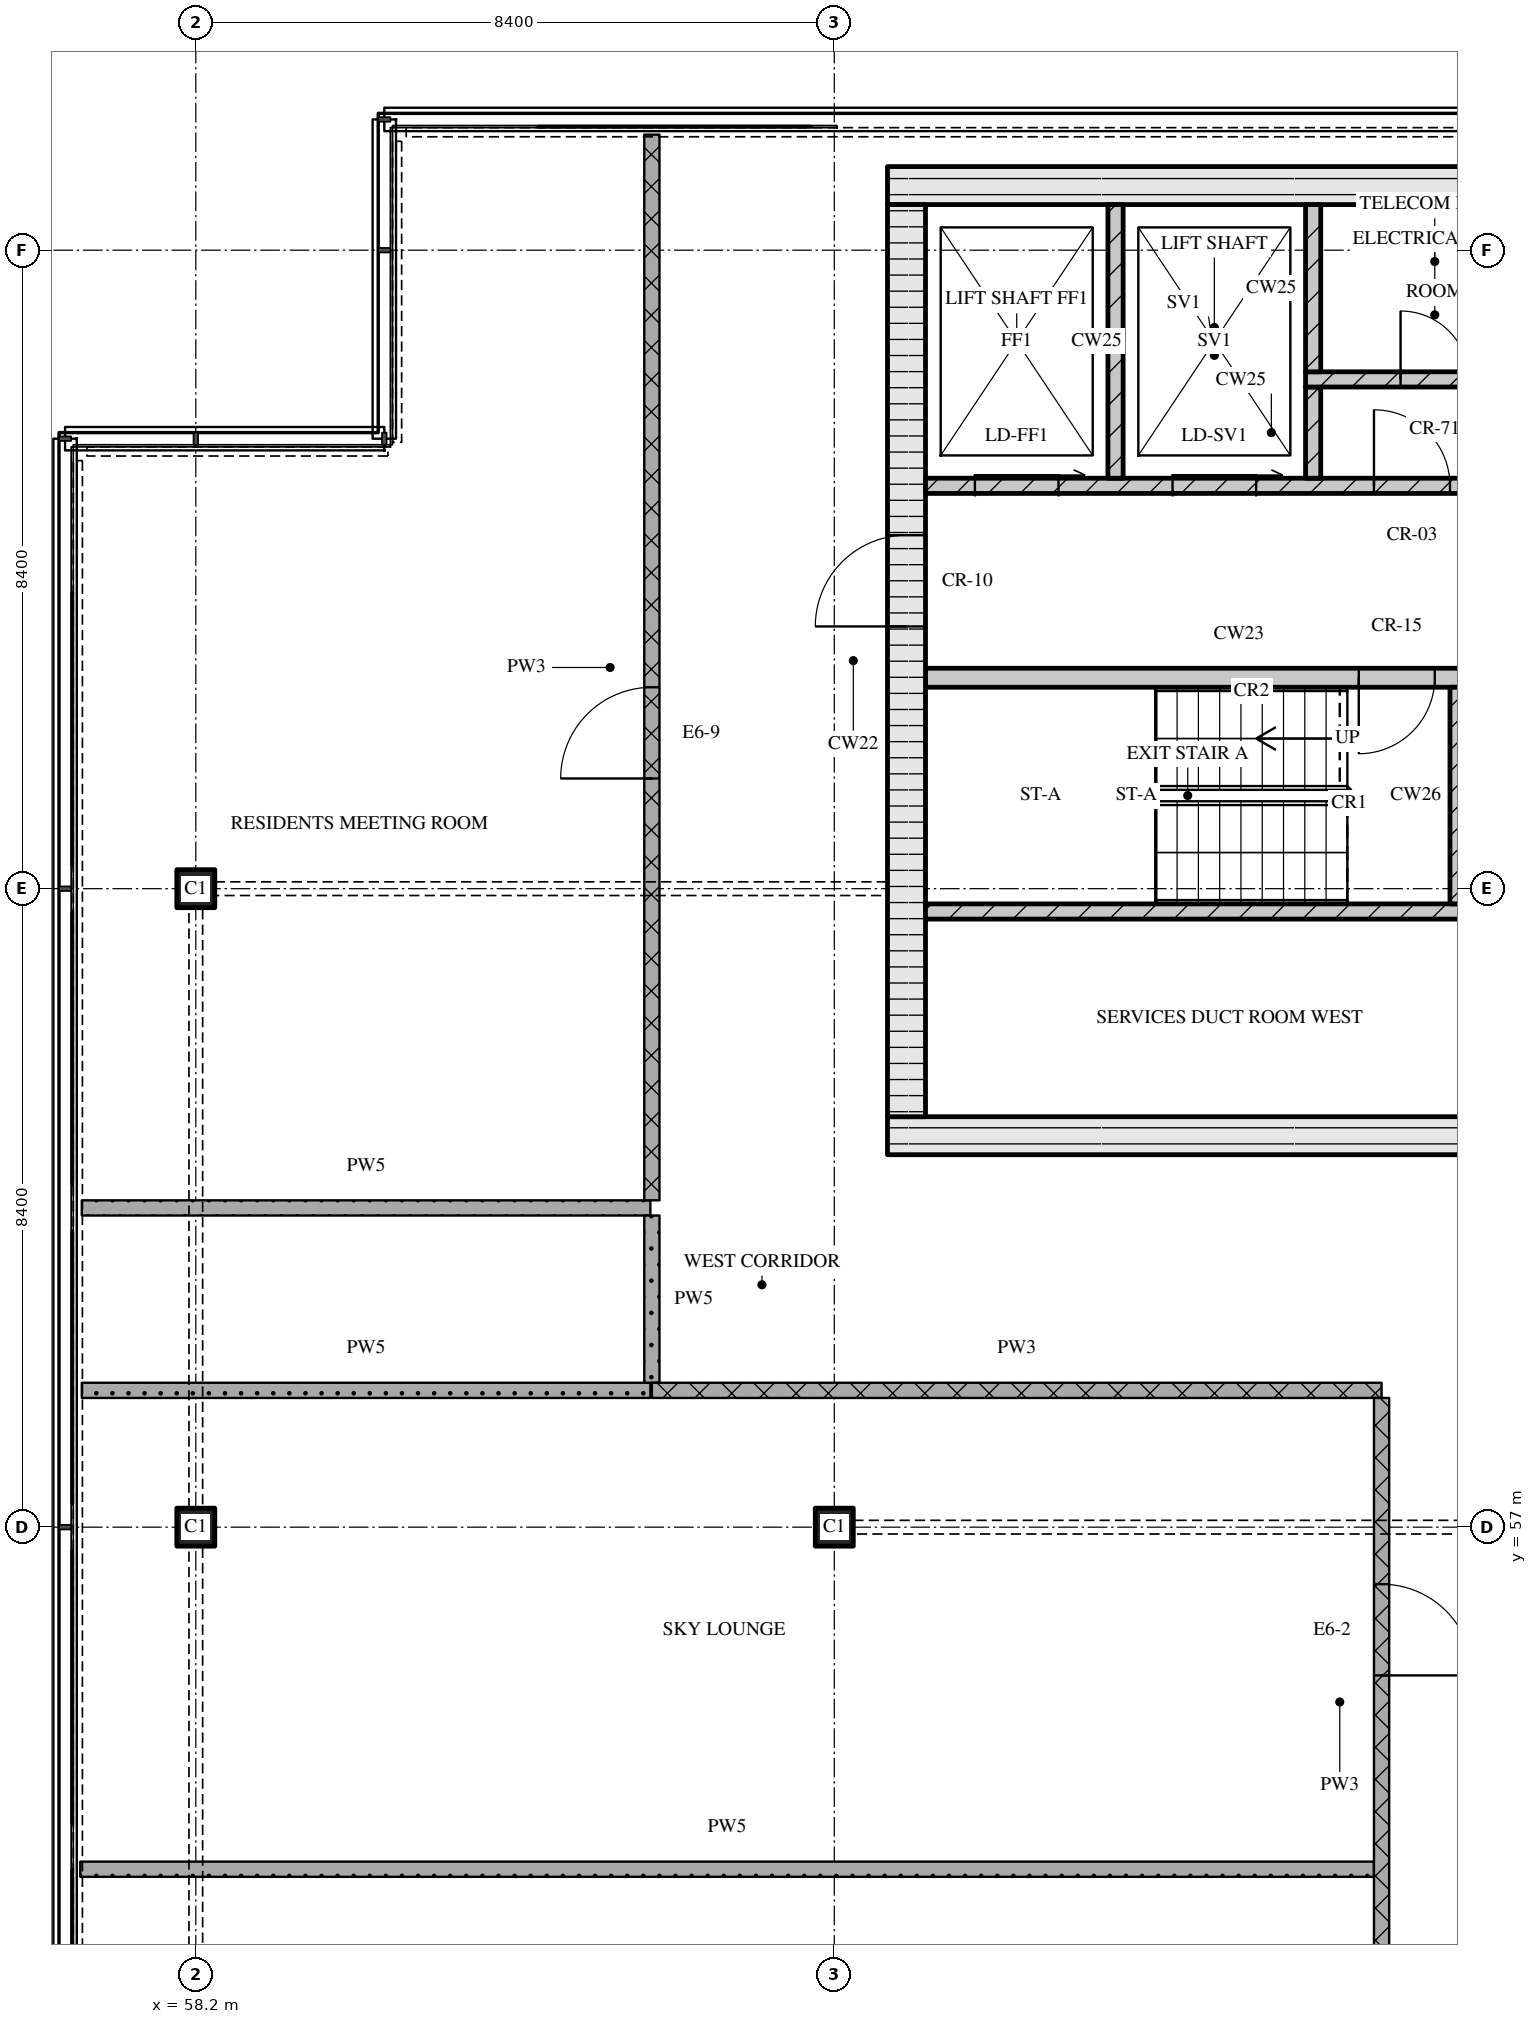
"""IFC4 building model, lengths in metres.
Left out: names, types, materials, properties, quantities, classifications, styles, units other than length and angle.
Written with IfcOpenShell. Run it as: python <this file> out.ifc"""

import sys

from ifc_helpers import new_model, si_unit, direction, frame, frame_2d, origin, origin_2d, place, context, subcontext, project, spatial, rectangle, extrude, element, fill, save


model = new_model("IFC4")
c1 = context("Model", 3, precision=1e-05, world=origin(), true_north=direction((0.0, 1.0)))
c2 = subcontext(c1, "Body", "Model", "MODEL_VIEW")
j1 = project(units=[si_unit("LENGTHUNIT", "METRE"), si_unit("PLANEANGLEUNIT", "RADIAN")], contexts=[c1])
p1 = place(None, origin())
s1 = spatial("IfcSite", under=j1, at=p1, CompositionType="ELEMENT")
p2 = place(p1, origin())
s2 = spatial("IfcBuilding", under=s1, at=p2, CompositionType="ELEMENT")
p3 = place(p2, frame((0.0, 0.0, 306.75)))
s3 = spatial("IfcBuildingStorey", under=s2, at=p3, CompositionType="ELEMENT", Elevation=306.75)
for number, where, z_axis, x_axis in (
    (1, (58.2, 57.0, 0.0), (0.0, 0.0, 1.0), (1.0, 0.0, 0.0)),
    (2, (58.2, 65.4, 0.0), (0.0, 0.0, 1.0), (1.0, 0.0, 0.0)),
    (3, (66.6, 57.0, 0.0), (0.0, 0.0, 1.0), (1.0, 0.0, 0.0)),
):
    element("IfcColumn", number, at=place(p3, frame(where, z_axis=z_axis, x_axis=x_axis)), inside=s3, PredefinedType="COLUMN", context=c2, shape_type="SweptSolid", body=[
        extrude(rectangle(XDim=0.5, YDim=0.5, at=origin_2d()), origin(), (0.0, 0.0, 1.0), 3.6),
    ])
p4 = place(p3, frame((67.3, 62.15, 0.0), z_axis=(0.0, 0.0, 1.0), x_axis=(1.0, 0.0, 0.0)))
e4 = element("IfcWall", 4, at=p4, inside=s3, PredefinedType="SOLIDWALL", context=c2, shape_type="SweptSolid", body=[
    extrude(rectangle(XDim=40.6, YDim=0.5, at=frame_2d((20.3, 0.0))), origin(), (0.0, 0.0, 1.0), 3.3),
])
p5 = place(p4, frame((20.65, 0.0, 0.0)))
e5 = element("IfcOpeningElement", 5, at=p5, cuts=e4, PredefinedType="OPENING", context=c2, shape_type="SweptSolid", body=[
    extrude(rectangle(XDim=1.8, YDim=2.1, at=frame_2d((0.9, 1.05))), frame((0.0, 0.26, 0.0), z_axis=(0.0, -1.0, 0.0), x_axis=(1.0, 0.0, 0.0)), (0.0, 0.0, 1.0), 0.52),
])
p6 = place(p3, frame((67.3, 74.65, 0.0), z_axis=(0.0, 0.0, 1.0), x_axis=(1.0, 0.0, 0.0)))
e6 = element("IfcWall", 6, at=p6, inside=s3, PredefinedType="SOLIDWALL", context=c2, shape_type="SweptSolid", body=[
    extrude(rectangle(XDim=40.6, YDim=0.5, at=frame_2d((20.3, 0.0))), origin(), (0.0, 0.0, 1.0), 3.3),
])
p7 = place(p3, frame((67.55, 62.4, 0.0), z_axis=(0.0, 0.0, 1.0), x_axis=(0.0, 1.0, 0.0)))
e7 = element("IfcWall", 7, at=p7, inside=s3, PredefinedType="SOLIDWALL", context=c2, shape_type="SweptSolid", body=[
    extrude(rectangle(XDim=12.0, YDim=0.5, at=frame_2d((6.0, 0.0))), origin(), (0.0, 0.0, 1.0), 3.3),
])
p8 = place(p7, frame((6.45, 0.0, 0.0)))
e8 = element("IfcOpeningElement", 8, at=p8, cuts=e7, PredefinedType="OPENING", context=c2, shape_type="SweptSolid", body=[
    extrude(rectangle(XDim=1.2, YDim=2.1, at=frame_2d((0.6, 1.05))), frame((0.0, 0.26, 0.0), z_axis=(0.0, -1.0, 0.0), x_axis=(1.0, 0.0, 0.0)), (0.0, 0.0, 1.0), 0.52),
])
p9 = place(p3, frame((67.8, 65.1, 0.0), z_axis=(0.0, 0.0, 1.0), x_axis=(1.0, 0.0, 0.0)))
e9 = element("IfcWall", 9, at=p9, inside=s3, PredefinedType="SOLIDWALL", context=c2, shape_type="SweptSolid", body=[
    extrude(rectangle(XDim=18.5, YDim=0.2, at=frame_2d((9.25, 0.0))), origin(), (0.0, 0.0, 1.0), 3.3),
])
p10 = place(p9, frame((7.27, 0.0, 0.0)))
e10 = element("IfcOpeningElement", 10, at=p10, cuts=e9, PredefinedType="OPENING", context=c2, shape_type="SweptSolid", body=[
    extrude(rectangle(XDim=0.9, YDim=2.1, at=frame_2d((0.45, 1.05))), frame((0.0, 0.11, 0.0), z_axis=(0.0, -1.0, 0.0), x_axis=(1.0, 0.0, 0.0)), (0.0, 0.0, 1.0), 0.22),
])
p11 = place(p9, frame((11.45, 0.0, 0.0)))
e11 = element("IfcOpeningElement", 11, at=p11, cuts=e9, PredefinedType="OPENING", context=c2, shape_type="SweptSolid", body=[
    extrude(rectangle(XDim=0.9, YDim=2.1, at=frame_2d((0.45, 1.05))), frame((0.0, 0.11, 0.0), z_axis=(0.0, -1.0, 0.0), x_axis=(1.0, 0.0, 0.0)), (0.0, 0.0, 1.0), 0.22),
])
p12 = place(p9, frame((16.7, 0.0, 0.0)))
e12 = element("IfcOpeningElement", 12, at=p12, cuts=e9, PredefinedType="OPENING", context=c2, shape_type="SweptSolid", body=[
    extrude(rectangle(XDim=0.9, YDim=2.1, at=frame_2d((0.45, 1.05))), frame((0.0, 0.11, 0.0), z_axis=(0.0, -1.0, 0.0), x_axis=(1.0, 0.0, 0.0)), (0.0, 0.0, 1.0), 0.22),
])
p13 = place(p3, frame((74.85, 65.2, 0.0), z_axis=(0.0, 0.0, 1.0), x_axis=(0.0, 1.0, 0.0)))
e13 = element("IfcWall", 13, at=p13, inside=s3, PredefinedType="SOLIDWALL", context=c2, shape_type="SweptSolid", body=[
    extrude(rectangle(XDim=2.85, YDim=0.3, at=frame_2d((1.425, 0.0))), origin(), (0.0, 0.0, 1.0), 3.3),
])
p14 = place(p3, frame((67.8, 68.175, 0.0), z_axis=(0.0, 0.0, 1.0), x_axis=(1.0, 0.0, 0.0)))
e14 = element("IfcWall", 14, at=p14, inside=s3, PredefinedType="SOLIDWALL", context=c2, shape_type="SweptSolid", body=[
    extrude(rectangle(XDim=8.25, YDim=0.25, at=frame_2d((4.125, 0.0))), origin(), (0.0, 0.0, 1.0), 3.3),
])
p15 = place(p14, frame((5.7, 0.0, 0.0)))
e15 = element("IfcOpeningElement", 15, at=p15, cuts=e14, PredefinedType="OPENING", context=c2, shape_type="SweptSolid", body=[
    extrude(rectangle(XDim=1.0, YDim=2.1, at=frame_2d((0.5, 1.05))), frame((0.0, 0.135, 0.0), z_axis=(0.0, -1.0, 0.0), x_axis=(1.0, 0.0, 0.0)), (0.0, 0.0, 1.0), 0.27),
])
p16 = place(p14, frame((7.2, 0.0, 0.0)))
e16 = element("IfcOpeningElement", 16, at=p16, cuts=e14, PredefinedType="OPENING", context=c2, shape_type="SweptSolid", body=[
    extrude(rectangle(XDim=0.8, YDim=2.1, at=frame_2d((0.4, 1.05))), frame((0.0, 0.135, 0.0), z_axis=(0.0, -1.0, 0.0), x_axis=(1.0, 0.0, 0.0)), (0.0, 0.0, 1.0), 0.27),
])
p17 = place(p3, frame((67.8, 70.7, 0.0), z_axis=(0.0, 0.0, 1.0), x_axis=(1.0, 0.0, 0.0)))
e17 = element("IfcWall", 17, at=p17, inside=s3, PredefinedType="SOLIDWALL", context=c2, shape_type="SweptSolid", body=[
    extrude(rectangle(XDim=39.6, YDim=0.2, at=frame_2d((19.8, 0.0))), origin(), (0.0, 0.0, 1.0), 3.3),
])
p18 = place(p17, frame((0.65, 0.0, 0.0)))
e18 = element("IfcOpeningElement", 18, at=p18, cuts=e17, PredefinedType="OPENING", context=c2, shape_type="SweptSolid", body=[
    extrude(rectangle(XDim=1.1, YDim=2.1, at=frame_2d((0.55, 1.05))), frame((0.0, 0.11, 0.0), z_axis=(0.0, -1.0, 0.0), x_axis=(1.0, 0.0, 0.0)), (0.0, 0.0, 1.0), 0.22),
])
p19 = place(p17, frame((3.25, 0.0, 0.0)))
e19 = element("IfcOpeningElement", 19, at=p19, cuts=e17, PredefinedType="OPENING", context=c2, shape_type="SweptSolid", body=[
    extrude(rectangle(XDim=1.1, YDim=2.1, at=frame_2d((0.55, 1.05))), frame((0.0, 0.11, 0.0), z_axis=(0.0, -1.0, 0.0), x_axis=(1.0, 0.0, 0.0)), (0.0, 0.0, 1.0), 0.22),
])
p20 = place(p17, frame((5.9, 0.0, 0.0)))
e20 = element("IfcOpeningElement", 20, at=p20, cuts=e17, PredefinedType="OPENING", context=c2, shape_type="SweptSolid", body=[
    extrude(rectangle(XDim=1.0, YDim=2.1, at=frame_2d((0.5, 1.05))), frame((0.0, 0.11, 0.0), z_axis=(0.0, -1.0, 0.0), x_axis=(1.0, 0.0, 0.0)), (0.0, 0.0, 1.0), 0.22),
])
p21 = place(p17, frame((21.7, 0.0, 0.0)))
e21 = element("IfcOpeningElement", 21, at=p21, cuts=e17, PredefinedType="OPENING", context=c2, shape_type="SweptSolid", body=[
    extrude(rectangle(XDim=1.0, YDim=2.1, at=frame_2d((0.5, 1.05))), frame((0.0, 0.11, 0.0), z_axis=(0.0, -1.0, 0.0), x_axis=(1.0, 0.0, 0.0)), (0.0, 0.0, 1.0), 0.22),
])
p22 = place(p17, frame((32.7, 0.0, 0.0)))
e22 = element("IfcOpeningElement", 22, at=p22, cuts=e17, PredefinedType="OPENING", context=c2, shape_type="SweptSolid", body=[
    extrude(rectangle(XDim=1.0, YDim=2.1, at=frame_2d((0.5, 1.05))), frame((0.0, 0.11, 0.0), z_axis=(0.0, -1.0, 0.0), x_axis=(1.0, 0.0, 0.0)), (0.0, 0.0, 1.0), 0.22),
])
p23 = place(p17, frame((35.25, 0.0, 0.0)))
e23 = element("IfcOpeningElement", 23, at=p23, cuts=e17, PredefinedType="OPENING", context=c2, shape_type="SweptSolid", body=[
    extrude(rectangle(XDim=1.1, YDim=2.1, at=frame_2d((0.55, 1.05))), frame((0.0, 0.11, 0.0), z_axis=(0.0, -1.0, 0.0), x_axis=(1.0, 0.0, 0.0)), (0.0, 0.0, 1.0), 0.22),
])
p24 = place(p17, frame((37.85, 0.0, 0.0)))
e24 = element("IfcOpeningElement", 24, at=p24, cuts=e17, PredefinedType="OPENING", context=c2, shape_type="SweptSolid", body=[
    extrude(rectangle(XDim=1.1, YDim=2.1, at=frame_2d((0.55, 1.05))), frame((0.0, 0.11, 0.0), z_axis=(0.0, -1.0, 0.0), x_axis=(1.0, 0.0, 0.0)), (0.0, 0.0, 1.0), 0.22),
])
p25 = place(p3, frame((70.3, 70.8, 0.0), z_axis=(0.0, 0.0, 1.0), x_axis=(0.0, 1.0, 0.0)))
e25 = element("IfcWall", 25, at=p25, inside=s3, PredefinedType="SOLIDWALL", context=c2, shape_type="SweptSolid", body=[
    extrude(rectangle(XDim=3.6, YDim=0.2, at=frame_2d((1.8, 0.0))), origin(), (0.0, 0.0, 1.0), 3.3),
])
p26 = place(p3, frame((72.9, 70.8, 0.0), z_axis=(0.0, 0.0, 1.0), x_axis=(0.0, 1.0, 0.0)))
e26 = element("IfcWall", 26, at=p26, inside=s3, PredefinedType="SOLIDWALL", context=c2, shape_type="SweptSolid", body=[
    extrude(rectangle(XDim=1.2, YDim=0.2, at=frame_2d((0.6, 0.0))), origin(), (0.0, 0.0, 1.0), 3.3),
])
p27 = place(p3, frame((72.8, 72.1, 0.0), z_axis=(0.0, 0.0, 1.0), x_axis=(1.0, 0.0, 0.0)))
e27 = element("IfcWall", 27, at=p27, inside=s3, PredefinedType="SOLIDWALL", context=c2, shape_type="SweptSolid", body=[
    extrude(rectangle(XDim=8.92, YDim=0.2, at=frame_2d((4.46, 0.0))), origin(), (0.0, 0.0, 1.0), 3.3),
])
p28 = place(p27, frame((1.25, 0.0, 0.0)))
e28 = element("IfcOpeningElement", 28, at=p28, cuts=e27, PredefinedType="OPENING", context=c2, shape_type="SweptSolid", body=[
    extrude(rectangle(XDim=0.9, YDim=2.1, at=frame_2d((0.45, 1.05))), frame((0.0, 0.11, 0.0), z_axis=(0.0, -1.0, 0.0), x_axis=(1.0, 0.0, 0.0)), (0.0, 0.0, 1.0), 0.22),
])
p29 = place(p27, frame((4.45, 0.0, 0.0)))
e29 = element("IfcOpeningElement", 29, at=p29, cuts=e27, PredefinedType="OPENING", context=c2, shape_type="SweptSolid", body=[
    extrude(rectangle(XDim=0.9, YDim=2.1, at=frame_2d((0.45, 1.05))), frame((0.0, 0.11, 0.0), z_axis=(0.0, -1.0, 0.0), x_axis=(1.0, 0.0, 0.0)), (0.0, 0.0, 1.0), 0.22),
])
p30 = place(p27, frame((7.21, 0.0, 0.0)))
e30 = element("IfcOpeningElement", 30, at=p30, cuts=e27, PredefinedType="OPENING", context=c2, shape_type="SweptSolid", body=[
    extrude(rectangle(XDim=0.9, YDim=2.1, at=frame_2d((0.45, 1.05))), frame((0.0, 0.11, 0.0), z_axis=(0.0, -1.0, 0.0), x_axis=(1.0, 0.0, 0.0)), (0.0, 0.0, 1.0), 0.22),
])
p31 = place(p3, frame((72.9, 72.2, 0.0), z_axis=(0.0, 0.0, 1.0), x_axis=(0.0, 1.0, 0.0)))
e31 = element("IfcWall", 31, at=p31, inside=s3, PredefinedType="SOLIDWALL", context=c2, shape_type="SweptSolid", body=[
    extrude(rectangle(XDim=2.2, YDim=0.2, at=frame_2d((1.1, 0.0))), origin(), (0.0, 0.0, 1.0), 3.3),
])
p32 = place(p3, frame((56.68, 52.5, 0.0), z_axis=(0.0, 0.0, 1.0), x_axis=(1.0, 0.0, 0.0)))
e32 = element("IfcWall", 32, at=p32, inside=s3, PredefinedType="PARTITIONING", context=c2, shape_type="SweptSolid", body=[
    extrude(rectangle(XDim=17.02, YDim=0.2, at=frame_2d((8.51, 0.0))), origin(), (0.0, 0.0, 1.0), 3.3),
])
p33 = place(p3, frame((64.2, 58.8, 0.0), z_axis=(0.0, 0.0, 1.0), x_axis=(1.0, 0.0, 0.0)))
e33 = element("IfcWall", 33, at=p33, inside=s3, PredefinedType="PARTITIONING", context=c2, shape_type="SweptSolid", body=[
    extrude(rectangle(XDim=9.6, YDim=0.2, at=frame_2d((4.8, 0.0))), origin(), (0.0, 0.0, 1.0), 3.3),
])
for number, where, z_axis, x_axis in (
    (34, (56.7, 58.8, 0.0), (0.0, 0.0, 1.0), (1.0, 0.0, 0.0)),
    (35, (56.7, 61.2, 0.0), (0.0, 0.0, 1.0), (1.0, 0.0, 0.0)),
):
    element("IfcWall", number, at=place(p3, frame(where, z_axis=z_axis, x_axis=x_axis)), inside=s3, PredefinedType="PARTITIONING", context=c2, shape_type="SweptSolid", body=[
        extrude(rectangle(XDim=7.48, YDim=0.2, at=frame_2d((3.74, 0.0))), origin(), (0.0, 0.0, 1.0), 3.3),
    ])
p34 = place(p3, frame((64.2, 61.3, 0.0), z_axis=(0.0, 0.0, 1.0), x_axis=(0.0, 1.0, 0.0)))
e36 = element("IfcWall", 36, at=p34, inside=s3, PredefinedType="PARTITIONING", context=c2, shape_type="SweptSolid", body=[
    extrude(rectangle(XDim=14.02, YDim=0.2, at=frame_2d((7.01, 0.0))), origin(), (0.0, 0.0, 1.0), 3.3),
])
p35 = place(p34, frame((5.55, 0.0, 0.0)))
e37 = element("IfcOpeningElement", 37, at=p35, cuts=e36, PredefinedType="OPENING", context=c2, shape_type="SweptSolid", body=[
    extrude(rectangle(XDim=1.2, YDim=2.1, at=frame_2d((0.6, 1.05))), frame((0.0, 0.11, 0.0), z_axis=(0.0, -1.0, 0.0), x_axis=(1.0, 0.0, 0.0)), (0.0, 0.0, 1.0), 0.22),
])
p36 = place(p3, frame((64.2, 61.1, 0.0), z_axis=(0.0, 0.0, 1.0), x_axis=(0.0, -1.0, 0.0)))
e38 = element("IfcWall", 38, at=p36, inside=s3, PredefinedType="PARTITIONING", context=c2, shape_type="SweptSolid", body=[
    extrude(rectangle(XDim=2.2, YDim=0.2, at=frame_2d((1.1, 0.0))), origin(), (0.0, 0.0, 1.0), 3.3),
])
p37 = place(p3, frame((73.8, 50.7, 0.0), z_axis=(0.0, 0.0, 1.0), x_axis=(0.0, 1.0, 0.0)))
e39 = element("IfcWall", 39, at=p37, inside=s3, PredefinedType="PARTITIONING", context=c2, shape_type="SweptSolid", body=[
    extrude(rectangle(XDim=8.0, YDim=0.2, at=frame_2d((4.0, 0.0))), origin(), (0.0, 0.0, 1.0), 3.3),
])
p38 = place(p37, frame((4.35, 0.0, 0.0)))
e40 = element("IfcOpeningElement", 40, at=p38, cuts=e39, PredefinedType="OPENING", context=c2, shape_type="SweptSolid", body=[
    extrude(rectangle(XDim=1.2, YDim=2.1, at=frame_2d((0.6, 1.05))), frame((0.0, 0.11, 0.0), z_axis=(0.0, -1.0, 0.0), x_axis=(1.0, 0.0, 0.0)), (0.0, 0.0, 1.0), 0.22),
])
p39 = place(p15, origin())
e41 = element("IfcDoor", 41, at=p39, inside=s3, OperationType="SINGLE_SWING_RIGHT", PredefinedType="DOOR", context=c2, shape_type="SweptSolid", body=[
    extrude(rectangle(XDim=1.0, YDim=2.1, at=frame_2d((0.5, 1.05))), frame((0.0, 0.025, 0.0), z_axis=(0.0, -1.0, 0.0), x_axis=(1.0, 0.0, 0.0)), (0.0, 0.0, 1.0), 0.05),
])
fill(e15, e41)
p40 = place(p8, origin())
e42 = element("IfcDoor", 42, at=p40, inside=s3, OperationType="SINGLE_SWING_LEFT", PredefinedType="DOOR", context=c2, shape_type="SweptSolid", body=[
    extrude(rectangle(XDim=1.2, YDim=2.1, at=frame_2d((0.6, 1.05))), frame((0.0, 0.025, 0.0), z_axis=(0.0, -1.0, 0.0), x_axis=(1.0, 0.0, 0.0)), (0.0, 0.0, 1.0), 0.05),
])
fill(e8, e42)
p41 = place(p18, origin())
e43 = element("IfcDoor", 43, at=p41, inside=s3, OperationType="SLIDING_TO_RIGHT", PredefinedType="DOOR", context=c2, shape_type="SweptSolid", body=[
    extrude(rectangle(XDim=1.1, YDim=2.1, at=frame_2d((0.55, 1.05))), frame((0.0, 0.025, 0.0), z_axis=(0.0, -1.0, 0.0), x_axis=(1.0, 0.0, 0.0)), (0.0, 0.0, 1.0), 0.05),
])
fill(e18, e43)
p42 = place(p19, origin())
e44 = element("IfcDoor", 44, at=p42, inside=s3, OperationType="SLIDING_TO_RIGHT", PredefinedType="DOOR", context=c2, shape_type="SweptSolid", body=[
    extrude(rectangle(XDim=1.1, YDim=2.1, at=frame_2d((0.55, 1.05))), frame((0.0, 0.025, 0.0), z_axis=(0.0, -1.0, 0.0), x_axis=(1.0, 0.0, 0.0)), (0.0, 0.0, 1.0), 0.05),
])
fill(e19, e44)
p43 = place(p20, origin())
e45 = element("IfcDoor", 45, at=p43, inside=s3, OperationType="SINGLE_SWING_LEFT", PredefinedType="DOOR", context=c2, shape_type="SweptSolid", body=[
    extrude(rectangle(XDim=1.0, YDim=2.1, at=frame_2d((0.5, 1.05))), frame((0.0, 0.025, 0.0), z_axis=(0.0, -1.0, 0.0), x_axis=(1.0, 0.0, 0.0)), (0.0, 0.0, 1.0), 0.05),
])
fill(e20, e45)
p44 = place(p28, origin())
e46 = element("IfcDoor", 46, at=p44, inside=s3, OperationType="SINGLE_SWING_LEFT", PredefinedType="DOOR", context=c2, shape_type="SweptSolid", body=[
    extrude(rectangle(XDim=0.9, YDim=2.1, at=frame_2d((0.45, 1.05))), frame((0.0, 0.025, 0.0), z_axis=(0.0, -1.0, 0.0), x_axis=(1.0, 0.0, 0.0)), (0.0, 0.0, 1.0), 0.05),
])
fill(e28, e46)
p45 = place(p35, origin())
e47 = element("IfcDoor", 47, at=p45, inside=s3, OperationType="SINGLE_SWING_LEFT", PredefinedType="DOOR", context=c2, shape_type="SweptSolid", body=[
    extrude(rectangle(XDim=1.2, YDim=2.1, at=frame_2d((0.6, 1.05))), frame((0.0, 0.025, 0.0), z_axis=(0.0, -1.0, 0.0), x_axis=(1.0, 0.0, 0.0)), (0.0, 0.0, 1.0), 0.05),
])
fill(e37, e47)
p46 = place(p38, origin())
e48 = element("IfcDoor", 48, at=p46, inside=s3, OperationType="SINGLE_SWING_RIGHT", PredefinedType="DOOR", context=c2, shape_type="SweptSolid", body=[
    extrude(rectangle(XDim=1.2, YDim=2.1, at=frame_2d((0.6, 1.05))), frame((0.0, 0.025, 0.0), z_axis=(0.0, -1.0, 0.0), x_axis=(1.0, 0.0, 0.0)), (0.0, 0.0, 1.0), 0.05),
])
fill(e40, e48)
save(model, sys.argv[1])
